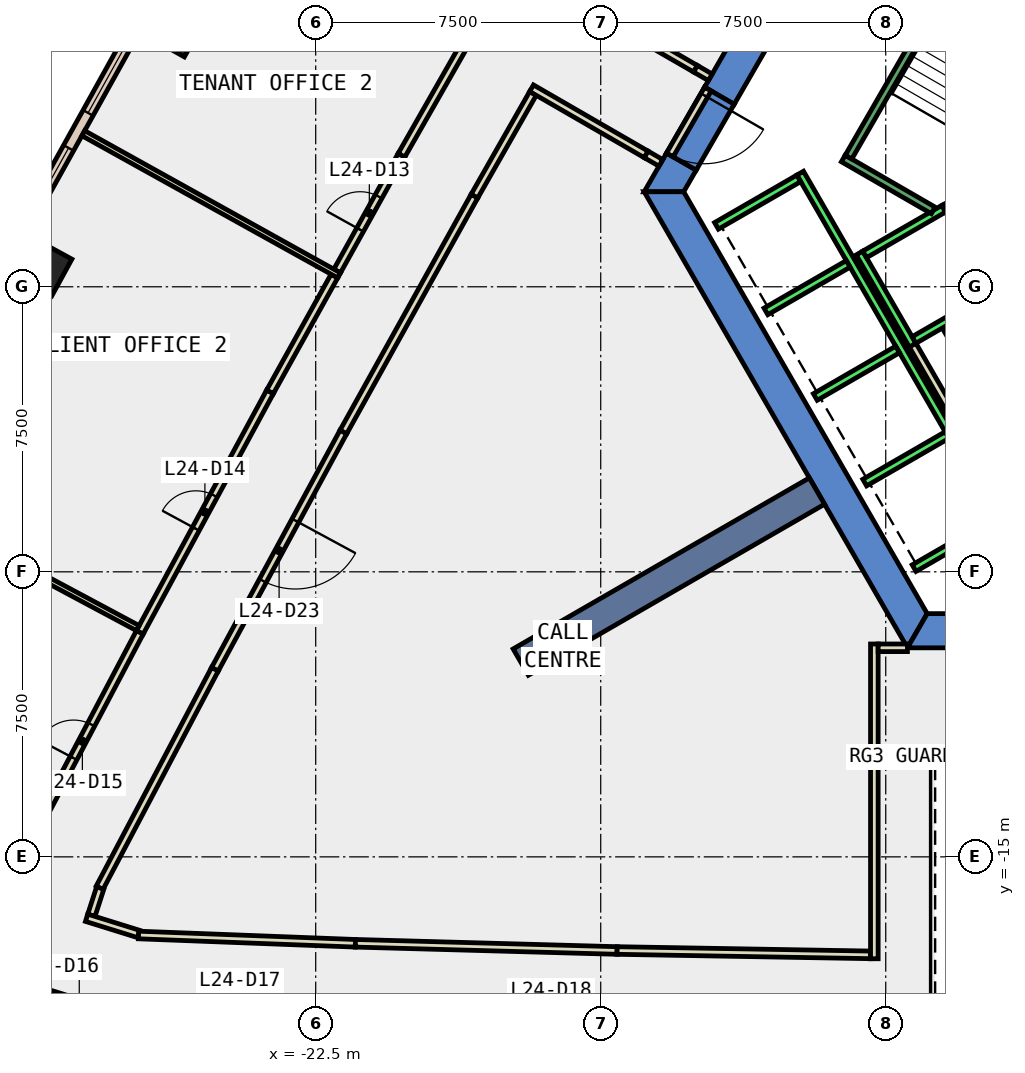
"""IFC4 building model, lengths in metres.
Left out: names, types, materials, properties, quantities, classifications, styles, units other than length and angle.
Written with IfcOpenShell. Run it as: python <this file> out.ifc"""

import sys

from ifc_helpers import new_model, si_unit, direction, frame, frame_2d, origin, origin_2d, place, context, subcontext, project, spatial, polyline, rectangle, outline, extrude, element, fill, save


model = new_model("IFC4")
c1 = context("Model", 3, precision=1e-05, world=origin(), true_north=direction((0.0, 1.0)))
c2 = subcontext(c1, "Body", "Model", "MODEL_VIEW")
j1 = project(units=[si_unit("LENGTHUNIT", "METRE"), si_unit("PLANEANGLEUNIT", "RADIAN")], contexts=[c1])
p1 = place(None, origin())
s1 = spatial("IfcSite", under=j1, at=p1, CompositionType="ELEMENT")
p2 = place(p1, origin())
s2 = spatial("IfcBuilding", under=s1, at=p2, CompositionType="ELEMENT")
p3 = place(p2, frame((0.0, 0.0, 111.8)))
s3 = spatial("IfcBuildingStorey", under=s2, at=p3, CompositionType="ELEMENT", Elevation=111.8)
for number, where, z_axis, x_axis in (
    (1, (-26.341, 6.896, -0.4), (0.0, 0.0, 1.0), (0.49, 0.872, 0.0)),
    (2, (-29.838, 0.604, -0.4), (0.0, 0.0, 1.0), (0.48, 0.877, 0.0)),
):
    element("IfcColumn", number, at=place(p3, frame(where, z_axis=z_axis, x_axis=x_axis)), inside=s3, PredefinedType="COLUMN", context=c2, shape_type="SweptSolid", body=[
        extrude(rectangle(XDim=1.1, YDim=1.5, at=origin_2d()), origin(), (0.0, 0.0, 1.0), 4.2),
    ])
p4 = place(p3, frame((0.0, 0.0, -0.4)))
e3 = element("IfcWall", 3, at=p4, inside=s3, PredefinedType="SHEAR", context=c2, shape_type="SweptSolid", body=[
    extrude(outline(polyline([(-12.267, 5.252), (-11.488, 4.802), (-6.409, 13.6), (-6.928, 14.5), (-12.267, 5.252)])), origin(), (0.0, 0.0, 1.0), 4.2),
])
p5 = place(p3, frame((0.0, 0.0, -0.4)))
e4 = element("IfcWall", 4, at=p5, inside=s3, PredefinedType="SHEAR", context=c2, shape_type="SweptSolid", body=[
    extrude(outline(polyline([(-12.488, 3.07), (-13.267, 3.52), (-13.856, 2.5), (-12.817, 2.5), (-12.488, 3.07)])), origin(), (0.0, 0.0, 1.0), 4.2),
])
p6 = place(p3, frame((0.0, 0.0, 3.6)))
e5 = element("IfcWall", 5, at=p6, inside=s3, PredefinedType="SHEAR", context=c2, shape_type="SweptSolid", body=[
    extrude(outline(polyline([(-13.267, 3.52), (-12.488, 3.07), (-11.488, 4.802), (-12.267, 5.252), (-13.267, 3.52)])), origin(), (0.0, 0.0, 1.0), 0.2),
])
p7 = place(p3, frame((0.0, 0.0, -0.4)))
e6 = element("IfcWall", 6, at=p7, inside=s3, PredefinedType="SHEAR", context=c2, shape_type="SweptSolid", body=[
    extrude(outline(polyline([(-13.856, 2.5), (-6.928, -9.5), (-6.409, -8.6), (-12.817, 2.5), (-13.856, 2.5)])), origin(), (0.0, 0.0, 1.0), 4.2),
])
p8 = place(p3, frame((0.0, 0.0, -0.4)))
e7 = element("IfcWall", 7, at=p8, inside=s3, PredefinedType="SHEAR", context=c2, shape_type="SweptSolid", body=[
    extrude(outline(polyline([(3.75, -9.5), (3.75, -8.6), (-6.409, -8.6), (-6.928, -9.5), (3.75, -9.5)])), origin(), (0.0, 0.0, 1.0), 4.2),
])
p9 = place(p3, frame((-9.31, -5.375, -0.4), z_axis=(0.0, 0.0, 1.0), x_axis=(-0.866017533419, -0.500013631625, 0.0)))
e8 = element("IfcWall", 8, at=p9, inside=s3, PredefinedType="SHEAR", context=c2, shape_type="SweptSolid", body=[
    extrude(rectangle(XDim=9.0, YDim=0.8, at=frame_2d((4.5, 0.0))), origin(), (0.0, 0.0, 1.0), 4.2),
])
p10 = place(p3, frame((-27.262, 6.784, 0.0), z_axis=(0.0, 0.0, 1.0), x_axis=(-0.485822751649, -0.874057351654, 0.0)))
e9 = element("IfcWall", 9, at=p10, inside=s3, PredefinedType="STANDARD", context=c2, shape_type="SweptSolid", body=[
    extrude(rectangle(XDim=6.109, YDim=0.3, at=frame_2d((3.055, 0.0))), origin(), (0.0, 0.0, 1.0), 3.8),
])
p11 = place(p10, frame((0.527, 0.0, 0.9)))
e10 = element("IfcOpeningElement", 10, at=p11, cuts=e9, PredefinedType="OPENING", context=c2, shape_type="SweptSolid", body=[
    extrude(rectangle(XDim=2.0, YDim=2.6, at=frame_2d((1.0, 1.3))), frame((0.0, 0.16, 0.0), z_axis=(0.0, -1.0, 0.0), x_axis=(1.0, 0.0, 0.0)), (0.0, 0.0, 1.0), 0.32),
])
p12 = place(p10, frame((3.582, 0.0, 0.9)))
e11 = element("IfcOpeningElement", 11, at=p12, cuts=e9, PredefinedType="OPENING", context=c2, shape_type="SweptSolid", body=[
    extrude(rectangle(XDim=2.0, YDim=2.6, at=frame_2d((1.0, 1.3))), frame((0.0, 0.16, 0.0), z_axis=(0.0, -1.0, 0.0), x_axis=(1.0, 0.0, 0.0)), (0.0, 0.0, 1.0), 0.32),
])
p13 = place(p3, frame((-15.532, 7.484, 0.0), z_axis=(0.0, 0.0, 1.0), x_axis=(0.866045954906, -0.499964402723, 0.0)))
e12 = element("IfcWall", 12, at=p13, inside=s3, PredefinedType="PARTITIONING", context=c2, shape_type="SweptSolid", body=[
    extrude(rectangle(XDim=3.494, YDim=0.2, at=frame_2d((1.747, 0.0))), origin(), (0.0, 0.0, 1.0), 3.8),
])
p14 = place(p3, frame((-13.417, 3.26, 0.0), z_axis=(0.0, 0.0, 1.0), x_axis=(-0.866032067792, 0.499988457423, 0.0)))
e13 = element("IfcWall", 13, at=p14, inside=s3, PredefinedType="PARTITIONING", context=c2, shape_type="SweptSolid", body=[
    extrude(rectangle(XDim=0.45, YDim=0.2, at=frame_2d((0.225, 0.0))), origin(), (0.0, 0.0, 1.0), 2.4),
])
p15 = place(p3, frame((-16.783, 5.088, 0.0), z_axis=(0.0, 0.0, 1.0), x_axis=(-0.495023676383, -0.868879485211, 0.0)))
e14 = element("IfcWall", 14, at=p15, inside=s3, PredefinedType="PARTITIONING", context=c2, shape_type="SweptSolid", body=[
    extrude(rectangle(XDim=3.113, YDim=0.2, at=frame_2d((1.557, 0.0))), origin(), (0.0, 0.0, 1.0), 3.8),
])
p16 = place(p3, frame((-18.324, 2.383, 0.0), z_axis=(0.0, 0.0, 1.0), x_axis=(-0.485826874234, -0.874055060206, 0.0)))
e15 = element("IfcWall", 15, at=p16, inside=s3, PredefinedType="PARTITIONING", context=c2, shape_type="SweptSolid", body=[
    extrude(rectangle(XDim=7.099, YDim=0.2, at=frame_2d((3.55, 0.0))), origin(), (0.0, 0.0, 1.0), 3.8),
])
p17 = place(p3, frame((-21.773, -3.822, 0.0), z_axis=(0.0, 0.0, 1.0), x_axis=(-0.476124717613, -0.87937776483, 0.0)))
e16 = element("IfcWall", 16, at=p17, inside=s3, PredefinedType="PARTITIONING", context=c2, shape_type="SweptSolid", body=[
    extrude(rectangle(XDim=7.099, YDim=0.2, at=frame_2d((3.55, 0.0))), origin(), (0.0, 0.0, 1.0), 3.8),
])
p18 = place(p17, frame((2.65, 0.0, 0.0)))
e17 = element("IfcOpeningElement", 17, at=p18, cuts=e16, PredefinedType="OPENING", context=c2, shape_type="SweptSolid", body=[
    extrude(rectangle(XDim=1.8, YDim=2.1, at=frame_2d((0.9, 1.05))), frame((0.0, 0.11, 0.0), z_axis=(0.0, -1.0, 0.0), x_axis=(1.0, 0.0, 0.0)), (0.0, 0.0, 1.0), 0.22),
])
p19 = place(p3, frame((-25.153, -10.065, 0.0), z_axis=(0.0, 0.0, 1.0), x_axis=(-0.466663976618, -0.884434696813, 0.0)))
e18 = element("IfcWall", 18, at=p19, inside=s3, PredefinedType="PARTITIONING", context=c2, shape_type="SweptSolid", body=[
    extrude(rectangle(XDim=6.501, YDim=0.2, at=frame_2d((3.25, 0.0))), origin(), (0.0, 0.0, 1.0), 3.8),
])
p20 = place(p3, frame((-28.171, -15.821, 0.0), z_axis=(0.0, 0.0, 1.0), x_axis=(-0.308053137273, -0.951369152651, 0.0)))
e19 = element("IfcWall", 19, at=p20, inside=s3, PredefinedType="PARTITIONING", context=c2, shape_type="SweptSolid", body=[
    extrude(rectangle(XDim=0.754, YDim=0.2, at=frame_2d((0.377, 0.0))), origin(), (0.0, 0.0, 1.0), 3.8),
])
p21 = place(p3, frame((-28.529, -16.603, 0.0), z_axis=(0.0, 0.0, 1.0), x_axis=(0.954829998701, -0.297152609916, 0.0)))
e20 = element("IfcWall", 20, at=p21, inside=s3, PredefinedType="PARTITIONING", context=c2, shape_type="SweptSolid", body=[
    extrude(rectangle(XDim=1.437, YDim=0.2, at=frame_2d((0.719, 0.0))), origin(), (0.0, 0.0, 1.0), 3.8),
])
p22 = place(p3, frame((-27.162, -17.056, 0.0), z_axis=(0.0, 0.0, 1.0), x_axis=(0.999270868304, -0.038180253525, 0.0)))
e21 = element("IfcWall", 21, at=p22, inside=s3, PredefinedType="PARTITIONING", context=c2, shape_type="SweptSolid", body=[
    extrude(rectangle(XDim=5.71, YDim=0.2, at=frame_2d((2.855, 0.0))), origin(), (0.0, 0.0, 1.0), 3.8),
])
p23 = place(p3, frame((-21.456, -17.274, 0.0), z_axis=(0.0, 0.0, 1.0), x_axis=(0.999618915549, -0.02760477632, 0.0)))
e22 = element("IfcWall", 22, at=p23, inside=s3, PredefinedType="PARTITIONING", context=c2, shape_type="SweptSolid", body=[
    extrude(rectangle(XDim=6.89, YDim=0.2, at=frame_2d((3.445, 0.0))), origin(), (0.0, 0.0, 1.0), 3.8),
])
p24 = place(p3, frame((-14.569, -17.464, 0.0), z_axis=(0.0, 0.0, 1.0), x_axis=(0.999851389672, -0.017239448129, 0.0)))
e23 = element("IfcWall", 23, at=p24, inside=s3, PredefinedType="PARTITIONING", context=c2, shape_type="SweptSolid", body=[
    extrude(rectangle(XDim=6.67, YDim=0.2, at=frame_2d((3.335, 0.0))), origin(), (0.0, 0.0, 1.0), 3.8),
])
p25 = place(p3, frame((-21.936, 0.414, 0.0), z_axis=(0.0, 0.0, 1.0), x_axis=(0.485827202541, 0.874054877723, 0.0)))
e24 = element("IfcWall", 24, at=p25, inside=s3, PredefinedType="PARTITIONING", context=c2, shape_type="SweptSolid", body=[
    extrude(rectangle(XDim=3.487, YDim=0.2, at=frame_2d((1.744, 0.0))), origin(), (0.0, 0.0, 1.0), 3.8),
])
p26 = place(p25, frame((1.244, 0.0, 0.0)))
e25 = element("IfcOpeningElement", 25, at=p26, cuts=e24, PredefinedType="OPENING", context=c2, shape_type="SweptSolid", body=[
    extrude(rectangle(XDim=1.0, YDim=2.1, at=frame_2d((0.5, 1.05))), frame((0.0, 0.11, 0.0), z_axis=(0.0, -1.0, 0.0), x_axis=(1.0, 0.0, 0.0)), (0.0, 0.0, 1.0), 0.22),
])
p27 = place(p3, frame((-20.242, 3.462, 0.0), z_axis=(0.0, 0.0, 1.0), x_axis=(0.495309264725, 0.868716715781, 0.0)))
e26 = element("IfcWall", 26, at=p27, inside=s3, PredefinedType="PARTITIONING", context=c2, shape_type="SweptSolid", body=[
    extrude(rectangle(XDim=3.487, YDim=0.2, at=frame_2d((1.743, 0.0))), origin(), (0.0, 0.0, 1.0), 3.8),
])
p28 = place(p3, frame((-27.129, -9.094, 0.0), z_axis=(0.0, 0.0, 1.0), x_axis=(0.476090835435, 0.879396108938, 0.0)))
e27 = element("IfcWall", 27, at=p28, inside=s3, PredefinedType="PARTITIONING", context=c2, shape_type="SweptSolid", body=[
    extrude(rectangle(XDim=7.198, YDim=0.2, at=frame_2d((3.599, 0.0))), origin(), (0.0, 0.0, 1.0), 3.8),
])
p29 = place(p28, frame((3.099, 0.0, 0.0)))
e28 = element("IfcOpeningElement", 28, at=p29, cuts=e27, PredefinedType="OPENING", context=c2, shape_type="SweptSolid", body=[
    extrude(rectangle(XDim=1.0, YDim=2.1, at=frame_2d((0.5, 1.05))), frame((0.0, 0.11, 0.0), z_axis=(0.0, -1.0, 0.0), x_axis=(1.0, 0.0, 0.0)), (0.0, 0.0, 1.0), 0.22),
])
p30 = place(p3, frame((-23.702, -2.764, 0.0), z_axis=(0.0, 0.0, 1.0), x_axis=(0.485892653581, 0.874018494767, 0.0)))
e29 = element("IfcWall", 29, at=p30, inside=s3, PredefinedType="PARTITIONING", context=c2, shape_type="SweptSolid", body=[
    extrude(rectangle(XDim=3.486, YDim=0.2, at=frame_2d((1.743, 0.0))), origin(), (0.0, 0.0, 1.0), 3.8),
])
p31 = place(p3, frame((-30.221, -14.956, 0.0), z_axis=(0.0, 0.0, 1.0), x_axis=(0.466543318111, 0.884498350663, 0.0)))
e30 = element("IfcWall", 30, at=p31, inside=s3, PredefinedType="PARTITIONING", context=c2, shape_type="SweptSolid", body=[
    extrude(rectangle(XDim=6.627, YDim=0.2, at=frame_2d((3.314, 0.0))), origin(), (0.0, 0.0, 1.0), 3.8),
])
p32 = place(p31, frame((2.889, 0.0, 0.0)))
e31 = element("IfcOpeningElement", 31, at=p32, cuts=e30, PredefinedType="OPENING", context=c2, shape_type="SweptSolid", body=[
    extrude(rectangle(XDim=1.0, YDim=2.1, at=frame_2d((0.5, 1.05))), frame((0.0, 0.11, 0.0), z_axis=(0.0, -1.0, 0.0), x_axis=(1.0, 0.0, 0.0)), (0.0, 0.0, 1.0), 0.22),
])
p33 = place(p3, frame((-27.533, -19.217, 0.0), z_axis=(0.0, 0.0, 1.0), x_axis=(-0.954946345159, 0.296778499671, 0.0)))
e32 = element("IfcWall", 32, at=p33, inside=s3, PredefinedType="PARTITIONING", context=c2, shape_type="SweptSolid", body=[
    extrude(rectangle(XDim=2.49, YDim=0.2, at=frame_2d((1.245, 0.0))), origin(), (0.0, 0.0, 1.0), 3.8),
])
p34 = place(p33, frame((0.745, 0.0, 0.0)))
e33 = element("IfcOpeningElement", 33, at=p34, cuts=e32, PredefinedType="OPENING", context=c2, shape_type="SweptSolid", body=[
    extrude(rectangle(XDim=1.0, YDim=2.1, at=frame_2d((0.5, 1.05))), frame((0.0, 0.11, 0.0), z_axis=(0.0, -1.0, 0.0), x_axis=(1.0, 0.0, 0.0)), (0.0, 0.0, 1.0), 0.22),
])
p35 = place(p3, frame((-5.126, -2.422, 0.0), z_axis=(0.0, 0.0, 1.0), x_axis=(-0.500062241894, 0.865989465428, 0.0)))
e34 = element("IfcWall", 34, at=p35, inside=s3, PredefinedType="PARTITIONING", context=c2, shape_type="SweptSolid", body=[
    extrude(rectangle(XDim=1.7, YDim=0.2, at=frame_2d((0.85, 0.0))), origin(), (0.0, 0.0, 1.0), 3.8),
])
p36 = place(p3, frame((-5.492, -3.788, 0.0), z_axis=(0.0, 0.0, 1.0), x_axis=(-0.500008949224, 0.866020236886, 0.0)))
e35 = element("IfcWall", 35, at=p36, inside=s3, PredefinedType="PARTITIONING", context=c2, shape_type="SweptSolid", body=[
    extrude(rectangle(XDim=2.68, YDim=0.2, at=frame_2d((1.34, 0.0))), origin(), (0.0, 0.0, 1.0), 3.8),
])
p37 = place(p3, frame((-7.8, -17.681, 0.0), z_axis=(0.0, 0.0, 1.0), x_axis=(0.0, 1.0, 0.0)))
e36 = element("IfcWall", 36, at=p37, inside=s3, PredefinedType="PARTITIONING", context=c2, shape_type="SweptSolid", body=[
    extrude(rectangle(XDim=8.282, YDim=0.2, at=frame_2d((4.141, 0.0))), origin(), (0.0, 0.0, 1.0), 3.8),
])
p38 = place(p3, frame((-7.7, -9.499, 0.0), z_axis=(0.0, 0.0, 1.0), x_axis=(1.0, 0.0, 0.0)))
e37 = element("IfcWall", 37, at=p38, inside=s3, PredefinedType="PARTITIONING", context=c2, shape_type="SweptSolid", body=[
    extrude(rectangle(XDim=0.771, YDim=0.2, at=frame_2d((0.385, 0.0))), origin(), (0.0, 0.0, 1.0), 3.8),
])
p39 = place(p3, frame((-21.885, 0.3, 0.0), z_axis=(0.0, 0.0, 1.0), x_axis=(-0.874095944746, 0.485753311237, 0.0)))
e38 = element("IfcWall", 38, at=p39, inside=s3, PredefinedType="PARTITIONING", context=c2, shape_type="SweptSolid", body=[
    extrude(rectangle(XDim=7.699, YDim=0.15, at=frame_2d((3.85, 0.0))), origin(), (0.0, 0.0, 1.0), 3.8),
])
p40 = place(p3, frame((-27.182, -8.981, 0.0), z_axis=(0.0, 0.0, 1.0), x_axis=(-0.881899408669, 0.471437623647, 0.0)))
e39 = element("IfcWall", 39, at=p40, inside=s3, PredefinedType="PARTITIONING", context=c2, shape_type="SweptSolid", body=[
    extrude(rectangle(XDim=6.13, YDim=0.15, at=frame_2d((3.065, 0.0))), origin(), (0.0, 0.0, 1.0), 3.8),
])
p41 = place(p3, frame((-12.18, 5.202, 0.0), z_axis=(0.0, 0.0, 1.0), x_axis=(-0.50002537861, -0.866010750942, 0.0)))
e40 = element("IfcWall", 40, at=p41, inside=s3, PredefinedType="PARTITIONING", context=c2, shape_type="SweptSolid", body=[
    extrude(rectangle(XDim=2.0, YDim=0.2, at=frame_2d((1.0, 0.0))), origin(), (0.0, 0.0, 1.0), 2.4),
])
p42 = place(p41, frame((0.19, 0.0, 0.0)))
e41 = element("IfcOpeningElement", 41, at=p42, cuts=e40, PredefinedType="OPENING", context=c2, shape_type="SweptSolid", body=[
    extrude(rectangle(XDim=1.8, YDim=2.1, at=frame_2d((0.9, 1.05))), frame((0.0, 0.11, 0.0), z_axis=(0.0, -1.0, 0.0), x_axis=(1.0, 0.0, 0.0)), (0.0, 0.0, 1.0), 0.22),
])
p43 = place(p3, frame((-12.506, 5.737, 0.0), z_axis=(0.0, 0.0, 1.0), x_axis=(0.865624510465, -0.500693725627, 0.0)))
e42 = element("IfcWall", 42, at=p43, inside=s3, PredefinedType="PARTITIONING", context=c2, shape_type="SweptSolid", body=[
    extrude(rectangle(XDim=0.449, YDim=0.2, at=frame_2d((0.225, 0.0))), origin(), (0.0, 0.0, 1.0), 2.4),
])
p44 = place(p3, frame((-13.807, 3.485, 0.0), z_axis=(0.0, 0.0, 1.0), x_axis=(-0.865984597717, 0.500070671522, 0.0)))
e43 = element("IfcWall", 43, at=p44, inside=s3, PredefinedType="PARTITIONING", context=c2, shape_type="SweptSolid", body=[
    extrude(rectangle(XDim=3.479, YDim=0.2, at=frame_2d((1.74, 0.0))), origin(), (0.0, 0.0, 1.0), 3.8),
])
p45 = place(p3, frame((-5.94, 2.188, 0.0), z_axis=(0.0, 0.0, 1.0), x_axis=(0.49994636267, -0.866056369097, 0.0)))
e44 = element("IfcWall", 44, at=p45, inside=s3, PredefinedType="STANDARD", context=c2, shape_type="SweptSolid", body=[
    extrude(rectangle(XDim=2.8, YDim=0.2, at=frame_2d((1.4, 0.0))), origin(), (0.0, 0.0, 1.0), 3.8),
])
p46 = place(p45, frame((1.225, 0.0, 0.0)))
e45 = element("IfcOpeningElement", 45, at=p46, cuts=e44, PredefinedType="OPENING", context=c2, shape_type="SweptSolid", body=[
    extrude(rectangle(XDim=1.1, YDim=2.1, at=frame_2d((0.55, 1.05))), frame((0.0, 0.11, 0.0), z_axis=(0.0, -1.0, 0.0), x_axis=(1.0, 0.0, 0.0)), (0.0, 0.0, 1.0), 0.22),
])
p47 = place(p3, frame((-8.192, 0.888, 0.0), z_axis=(0.0, 0.0, 1.0), x_axis=(0.49994636267, -0.866056369097, 0.0)))
e46 = element("IfcWall", 46, at=p47, inside=s3, PredefinedType="STANDARD", context=c2, shape_type="SweptSolid", body=[
    extrude(rectangle(XDim=2.8, YDim=0.2, at=frame_2d((1.4, 0.0))), origin(), (0.0, 0.0, 1.0), 3.8),
])
for number, where, z_axis, x_axis in (
    (47, (-5.977, 2.052, 0.0), (0.0, 0.0, 1.0), (-0.866, -0.5, 0.0)),
    (48, (-4.677, -0.2, 0.0), (0.0, 0.0, 1.0), (-0.866, -0.5, 0.0)),
):
    element("IfcWall", number, at=place(p3, frame(where, z_axis=z_axis, x_axis=x_axis)), inside=s3, PredefinedType="STANDARD", context=c2, shape_type="SweptSolid", body=[
        extrude(rectangle(XDim=2.399, YDim=0.2, at=frame_2d((1.2, 0.0))), origin(), (0.0, 0.0, 1.0), 3.8),
    ])
p48 = place(p3, frame((-9.751, 2.99, 0.0), z_axis=(0.0, 0.0, 1.0), x_axis=(0.50000090737, -0.866024879913, 0.0)))
e49 = element("IfcWall", 49, at=p48, inside=s3, PredefinedType="STANDARD", context=c2, shape_type="SweptSolid", body=[
    extrude(rectangle(XDim=10.6, YDim=0.2, at=frame_2d((5.3, 0.0))), origin(), (0.0, 0.0, 1.0), 3.8),
])
p49 = place(p3, frame((-9.788, 2.853, 0.0), z_axis=(0.0, 0.0, 1.0), x_axis=(-0.865998541277, -0.500046524342, 0.0)))
e50 = element("IfcWall", 50, at=p49, inside=s3, PredefinedType="STANDARD", context=c2, shape_type="SweptSolid", body=[
    extrude(rectangle(XDim=2.5, YDim=0.2, at=frame_2d((1.25, 0.0))), origin(), (0.0, 0.0, 1.0), 3.8),
])
for number, where, z_axis, x_axis in (
    (51, (-8.488, 0.602, 0.0), (0.0, 0.0, 1.0), (-0.866, -0.5, 0.0)),
    (52, (-7.188, -1.65, 0.0), (0.0, 0.0, 1.0), (-0.866, -0.5, 0.0)),
    (53, (-5.888, -3.902, 0.0), (0.0, 0.0, 1.0), (-0.866, -0.5, 0.0)),
    (54, (-4.588, -6.153, 0.0), (0.0, 0.0, 1.0), (-0.866, -0.5, 0.0)),
):
    element("IfcWall", number, at=place(p3, frame(where, z_axis=z_axis, x_axis=x_axis)), inside=s3, PredefinedType="STANDARD", context=c2, shape_type="SweptSolid", body=[
        extrude(rectangle(XDim=2.5, YDim=0.2, at=frame_2d((1.25, 0.0))), origin(), (0.0, 0.0, 1.0), 3.8),
    ])
p50 = place(p3, frame((-6.25, 2.01, 0.0), z_axis=(0.0, 0.0, 1.0), x_axis=(-0.86611865017, 0.499838457731, 0.0)))
e55 = element("IfcWall", 55, at=p50, inside=s3, PredefinedType="STANDARD", context=c2, shape_type="SweptSolid", body=[
    extrude(rectangle(XDim=2.733, YDim=0.2, at=frame_2d((1.366, 0.0))), origin(), (0.0, 0.0, 1.0), 3.8),
])
p51 = place(p3, frame((-5.03, 9.388, 0.0), z_axis=(0.0, 0.0, 1.0), x_axis=(-0.499978703459, -0.866037698999, 0.0)))
e56 = element("IfcWall", 56, at=p51, inside=s3, PredefinedType="STANDARD", context=c2, shape_type="SweptSolid", body=[
    extrude(rectangle(XDim=6.9, YDim=0.2, at=frame_2d((3.45, 0.0))), origin(), (0.0, 0.0, 1.0), 3.8),
])
p52 = place(p11, origin())
e57 = element("IfcWindow", 57, at=p52, inside=s3, PartitioningType="SINGLE_PANEL", PredefinedType="WINDOW", context=c2, shape_type="SweptSolid", body=[
    extrude(rectangle(XDim=2.0, YDim=2.6, at=frame_2d((1.0, 1.3))), frame((0.0, 0.03, 0.0), z_axis=(0.0, -1.0, 0.0), x_axis=(1.0, 0.0, 0.0)), (0.0, 0.0, 1.0), 0.06),
])
fill(e10, e57)
p53 = place(p12, origin())
e58 = element("IfcWindow", 58, at=p53, inside=s3, PartitioningType="SINGLE_PANEL", PredefinedType="WINDOW", context=c2, shape_type="SweptSolid", body=[
    extrude(rectangle(XDim=2.0, YDim=2.6, at=frame_2d((1.0, 1.3))), frame((0.0, 0.03, 0.0), z_axis=(0.0, -1.0, 0.0), x_axis=(1.0, 0.0, 0.0)), (0.0, 0.0, 1.0), 0.06),
])
fill(e11, e58)
p54 = place(p26, origin())
e59 = element("IfcDoor", 59, at=p54, inside=s3, OperationType="SINGLE_SWING_RIGHT", PredefinedType="DOOR", context=c2, shape_type="SweptSolid", body=[
    extrude(rectangle(XDim=1.0, YDim=2.1, at=frame_2d((0.5, 1.05))), frame((0.0, 0.025, 0.0), z_axis=(0.0, -1.0, 0.0), x_axis=(1.0, 0.0, 0.0)), (0.0, 0.0, 1.0), 0.05),
])
fill(e25, e59)
p55 = place(p29, origin())
e60 = element("IfcDoor", 60, at=p55, inside=s3, OperationType="SINGLE_SWING_RIGHT", PredefinedType="DOOR", context=c2, shape_type="SweptSolid", body=[
    extrude(rectangle(XDim=1.0, YDim=2.1, at=frame_2d((0.5, 1.05))), frame((0.0, 0.025, 0.0), z_axis=(0.0, -1.0, 0.0), x_axis=(1.0, 0.0, 0.0)), (0.0, 0.0, 1.0), 0.05),
])
fill(e28, e60)
p56 = place(p32, origin())
e61 = element("IfcDoor", 61, at=p56, inside=s3, OperationType="SINGLE_SWING_LEFT", PredefinedType="DOOR", context=c2, shape_type="SweptSolid", body=[
    extrude(rectangle(XDim=1.0, YDim=2.1, at=frame_2d((0.5, 1.05))), frame((0.0, 0.025, 0.0), z_axis=(0.0, -1.0, 0.0), x_axis=(1.0, 0.0, 0.0)), (0.0, 0.0, 1.0), 0.05),
])
fill(e31, e61)
p57 = place(p18, origin())
e62 = element("IfcDoor", 62, at=p57, inside=s3, OperationType="DOUBLE_DOOR_SINGLE_SWING", PredefinedType="DOOR", context=c2, shape_type="SweptSolid", body=[
    extrude(rectangle(XDim=1.8, YDim=2.1, at=frame_2d((0.9, 1.05))), frame((0.0, 0.025, 0.0), z_axis=(0.0, -1.0, 0.0), x_axis=(1.0, 0.0, 0.0)), (0.0, 0.0, 1.0), 0.05),
])
fill(e17, e62)
p58 = place(p42, origin())
e63 = element("IfcDoor", 63, at=p58, inside=s3, OperationType="DOUBLE_DOOR_SINGLE_SWING", PredefinedType="DOOR", context=c2, shape_type="SweptSolid", body=[
    extrude(rectangle(XDim=1.8, YDim=2.1, at=frame_2d((0.9, 1.05))), frame((0.0, 0.025, 0.0), z_axis=(0.0, -1.0, 0.0), x_axis=(1.0, 0.0, 0.0)), (0.0, 0.0, 1.0), 0.05),
])
fill(e41, e63)
save(model, sys.argv[1])
